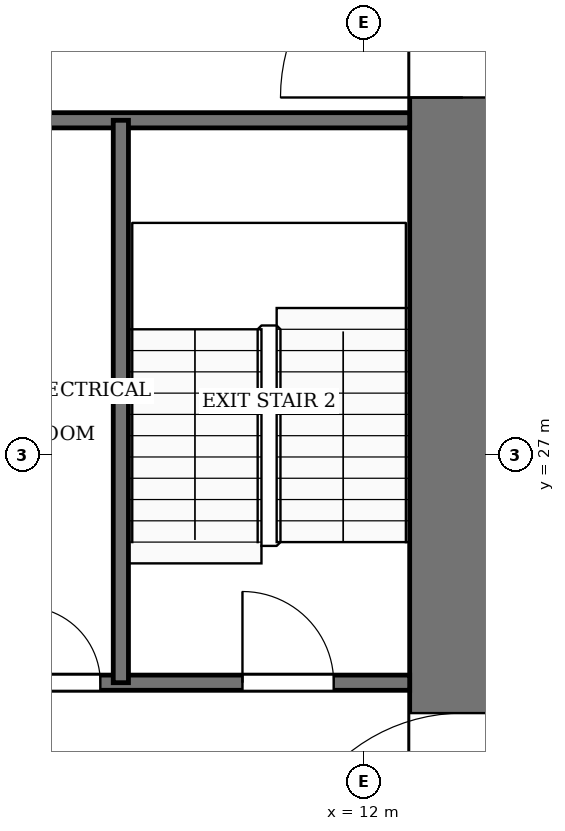
"""IFC4 building model, lengths in metres.
Left out: names, types, materials, properties, quantities, classifications, styles, units other than length and angle.
Written with IfcOpenShell. Run it as: python <this file> out.ifc"""

import sys

from ifc_helpers import new_model, si_unit, direction, frame, frame_2d, origin, place, context, subcontext, project, spatial, rectangle, extrude, element, fill, save


model = new_model("IFC4")
c1 = context("Model", 3, precision=1e-05, world=origin(), true_north=direction((0.0, 1.0)))
c2 = subcontext(c1, "Body", "Model", "MODEL_VIEW")
j1 = project(units=[si_unit("LENGTHUNIT", "METRE"), si_unit("PLANEANGLEUNIT", "RADIAN")], contexts=[c1])
p1 = place(None, origin())
s1 = spatial("IfcSite", under=j1, at=p1, CompositionType="ELEMENT")
p2 = place(p1, origin())
s2 = spatial("IfcBuilding", under=s1, at=p2, CompositionType="ELEMENT")
p3 = place(p2, frame((0.0, 0.0, 26.0)))
s3 = spatial("IfcBuildingStorey", under=s2, at=p3, CompositionType="ELEMENT", Elevation=26.0)
p4 = place(p3, frame((13.3, 18.4, -0.13), z_axis=(0.0, 0.0, 1.0), x_axis=(0.0, 1.0, 0.0)))
e1 = element("IfcWall", 1, at=p4, inside=s3, PredefinedType="SHEAR", context=c2, shape_type="SweptSolid", body=[
    extrude(rectangle(XDim=19.2, YDim=1.4, at=frame_2d((9.6, 0.0))), origin(), (0.0, 0.0, 1.0), 4.0),
])
p5 = place(p4, frame((2.8, 0.0, 0.13)))
e2 = element("IfcOpeningElement", 2, at=p5, cuts=e1, PredefinedType="OPENING", context=c2, shape_type="SweptSolid", body=[
    extrude(rectangle(XDim=2.4, YDim=2.4, at=frame_2d((1.2, 1.2))), frame((0.0, 0.71, 0.0), z_axis=(0.0, -1.0, 0.0), x_axis=(1.0, 0.0, 0.0)), (0.0, 0.0, 1.0), 1.42),
])
p6 = place(p4, frame((13.3, 0.0, 0.13)))
e3 = element("IfcOpeningElement", 3, at=p6, cuts=e1, PredefinedType="OPENING", context=c2, shape_type="SweptSolid", body=[
    extrude(rectangle(XDim=2.4, YDim=2.4, at=frame_2d((1.2, 1.2))), frame((0.0, 0.71, 0.0), z_axis=(0.0, -1.0, 0.0), x_axis=(1.0, 0.0, 0.0)), (0.0, 0.0, 1.0), 1.42),
])
p7 = place(p3, frame((6.0, 24.0, 0.0), z_axis=(0.0, 0.0, 1.0), x_axis=(1.0, 0.0, 0.0)))
e4 = element("IfcWall", 4, at=p7, inside=s3, PredefinedType="PARTITIONING", context=c2, shape_type="SweptSolid", body=[
    extrude(rectangle(XDim=6.6, YDim=0.2, at=frame_2d((3.3, 0.0))), origin(), (0.0, 0.0, 1.0), 3.87),
])
p8 = place(p7, frame((0.23, 0.0, 0.0)))
e5 = element("IfcOpeningElement", 5, at=p8, cuts=e4, PredefinedType="OPENING", context=c2, shape_type="SweptSolid", body=[
    extrude(rectangle(XDim=0.8, YDim=2.1, at=frame_2d((0.4, 1.05))), frame((0.0, 0.11, 0.0), z_axis=(0.0, -1.0, 0.0), x_axis=(1.0, 0.0, 0.0)), (0.0, 0.0, 1.0), 0.22),
])
p9 = place(p7, frame((1.53, 0.0, 0.0)))
e6 = element("IfcOpeningElement", 6, at=p9, cuts=e4, PredefinedType="OPENING", context=c2, shape_type="SweptSolid", body=[
    extrude(rectangle(XDim=1.0, YDim=2.1, at=frame_2d((0.5, 1.05))), frame((0.0, 0.11, 0.0), z_axis=(0.0, -1.0, 0.0), x_axis=(1.0, 0.0, 0.0)), (0.0, 0.0, 1.0), 0.22),
])
p10 = place(p7, frame((4.4, 0.0, 0.0)))
e7 = element("IfcOpeningElement", 7, at=p10, cuts=e4, PredefinedType="OPENING", context=c2, shape_type="SweptSolid", body=[
    extrude(rectangle(XDim=1.2, YDim=2.2, at=frame_2d((0.6, 1.1))), frame((0.0, 0.11, 0.0), z_axis=(0.0, -1.0, 0.0), x_axis=(1.0, 0.0, 0.0)), (0.0, 0.0, 1.0), 0.22),
])
p11 = place(p3, frame((6.0, 31.4, 0.0), z_axis=(0.0, 0.0, 1.0), x_axis=(1.0, 0.0, 0.0)))
e8 = element("IfcWall", 8, at=p11, inside=s3, PredefinedType="PARTITIONING", context=c2, shape_type="SweptSolid", body=[
    extrude(rectangle(XDim=6.6, YDim=0.2, at=frame_2d((3.3, 0.0))), origin(), (0.0, 0.0, 1.0), 3.87),
])
p12 = place(p3, frame((8.8, 24.0, 0.0), z_axis=(0.0, 0.0, 1.0), x_axis=(0.0, 1.0, 0.0)))
e9 = element("IfcWall", 9, at=p12, inside=s3, PredefinedType="PARTITIONING", context=c2, shape_type="SweptSolid", body=[
    extrude(rectangle(XDim=7.4, YDim=0.2, at=frame_2d((3.7, 0.0))), origin(), (0.0, 0.0, 1.0), 3.87),
])
p13 = place(p9, origin())
e10 = element("IfcDoor", 10, at=p13, inside=s3, OperationType="SINGLE_SWING_LEFT", PredefinedType="DOOR", context=c2, shape_type="SweptSolid", body=[
    extrude(rectangle(XDim=1.0, YDim=2.1, at=frame_2d((0.5, 1.05))), frame((0.0, 0.025, 0.0), z_axis=(0.0, -1.0, 0.0), x_axis=(1.0, 0.0, 0.0)), (0.0, 0.0, 1.0), 0.05),
])
fill(e6, e10)
p14 = place(p10, origin())
e11 = element("IfcDoor", 11, at=p14, inside=s3, OperationType="SINGLE_SWING_LEFT", PredefinedType="DOOR", context=c2, shape_type="SweptSolid", body=[
    extrude(rectangle(XDim=1.2, YDim=2.2, at=frame_2d((0.6, 1.1))), frame((0.0, 0.025, 0.0), z_axis=(0.0, -1.0, 0.0), x_axis=(1.0, 0.0, 0.0)), (0.0, 0.0, 1.0), 0.05),
])
fill(e7, e11)
p15 = place(p5, origin())
e12 = element("IfcDoor", 12, at=p15, inside=s3, OperationType="DOUBLE_DOOR_SINGLE_SWING", PredefinedType="DOOR", context=c2, shape_type="SweptSolid", body=[
    extrude(rectangle(XDim=2.4, YDim=2.4, at=frame_2d((1.2, 1.2))), frame((0.0, 0.025, 0.0), z_axis=(0.0, -1.0, 0.0), x_axis=(1.0, 0.0, 0.0)), (0.0, 0.0, 1.0), 0.05),
])
fill(e2, e12)
p16 = place(p6, origin())
e13 = element("IfcDoor", 13, at=p16, inside=s3, OperationType="DOUBLE_DOOR_SINGLE_SWING", PredefinedType="DOOR", context=c2, shape_type="SweptSolid", body=[
    extrude(rectangle(XDim=2.4, YDim=2.4, at=frame_2d((1.2, 1.2))), frame((0.0, 0.025, 0.0), z_axis=(0.0, -1.0, 0.0), x_axis=(1.0, 0.0, 0.0)), (0.0, 0.0, 1.0), 0.05),
])
fill(e3, e13)
save(model, sys.argv[1])
